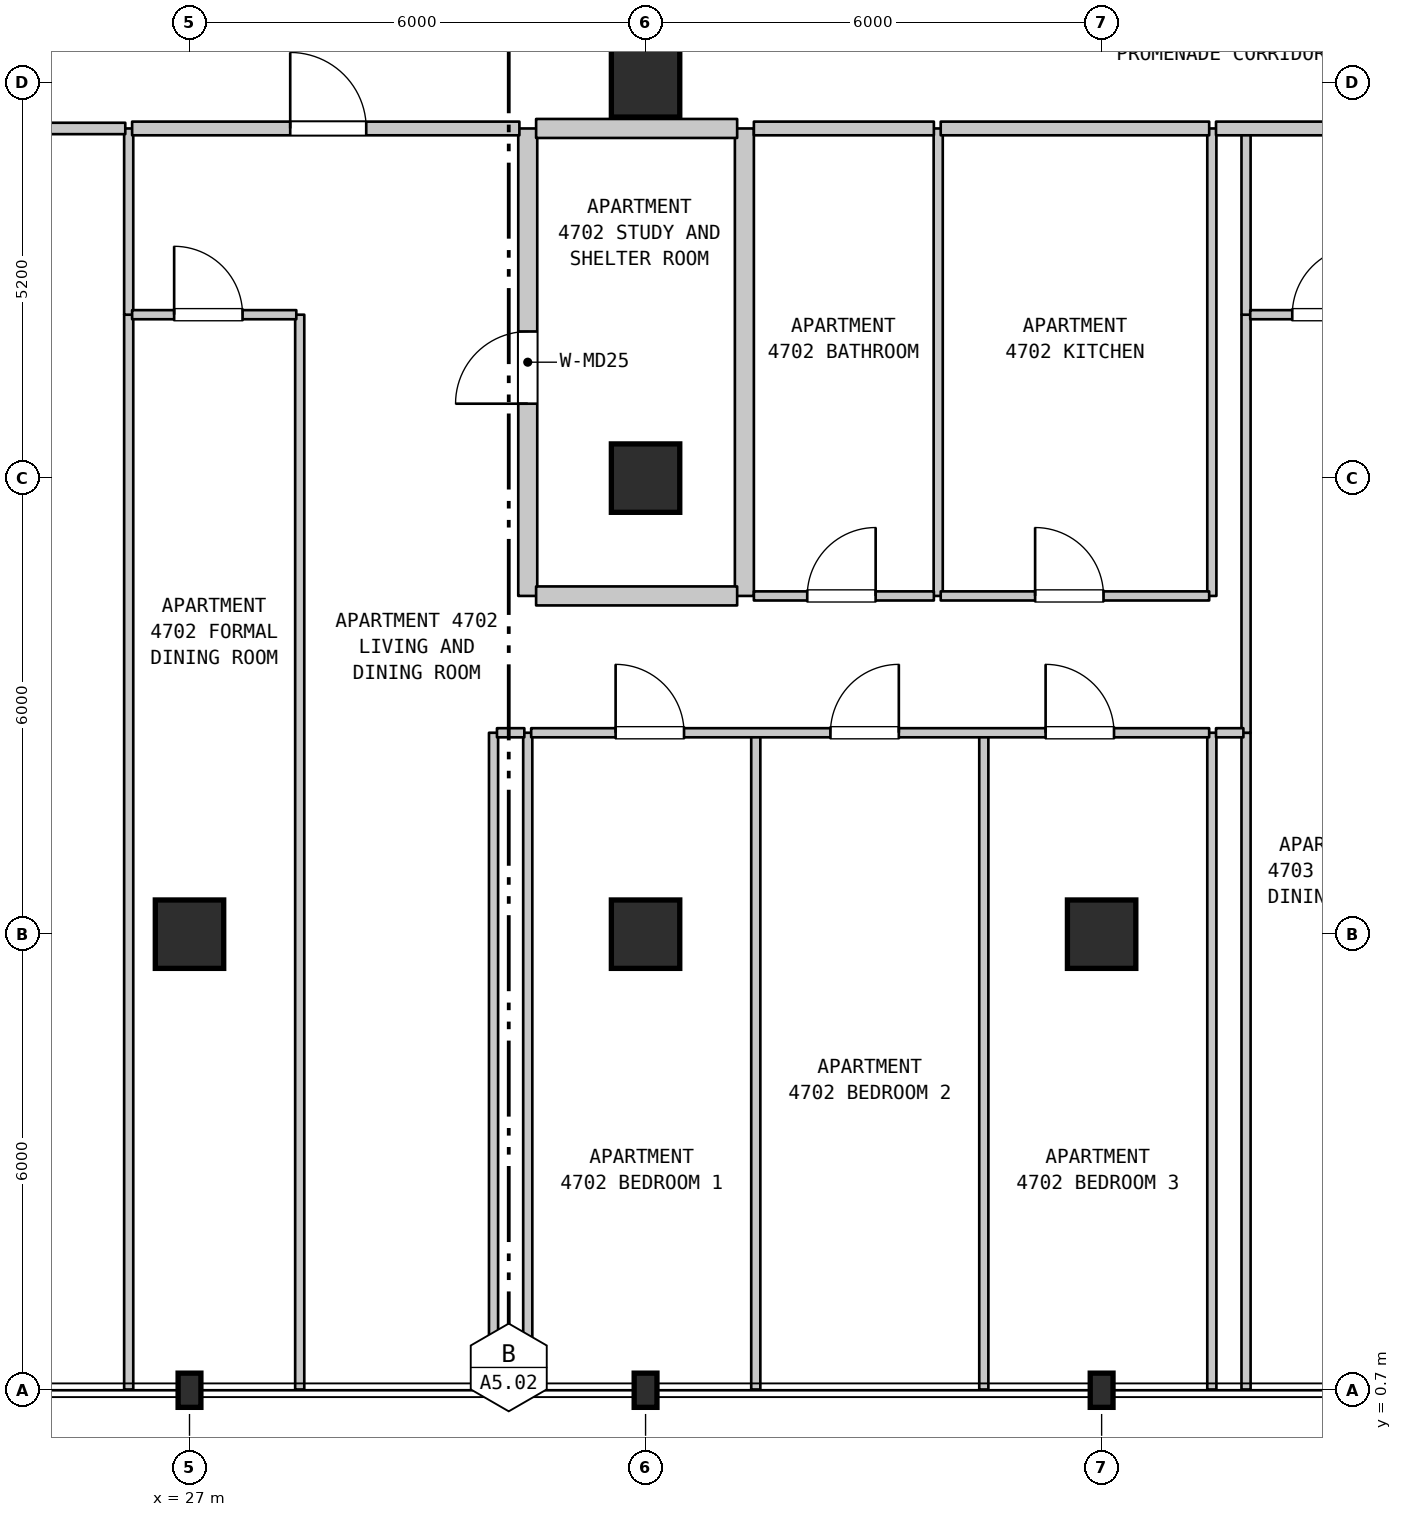
"""IFC4 building model, lengths in metres.
Left out: names, types, materials, properties, quantities, classifications, styles, units other than length and angle.
Written with IfcOpenShell. Run it as: python <this file> out.ifc"""

import sys

from ifc_helpers import new_model, si_unit, direction, frame, frame_2d, origin, origin_2d, place, context, subcontext, project, spatial, rectangle, i_section, extrude, element, fill, save


model = new_model("IFC4")
c1 = context("Model", 3, precision=1e-05, world=origin(), true_north=direction((0.0, 1.0)))
c2 = subcontext(c1, "Body", "Model", "MODEL_VIEW")
j1 = project(units=[si_unit("LENGTHUNIT", "METRE"), si_unit("PLANEANGLEUNIT", "RADIAN")], contexts=[c1])
p1 = place(None, origin())
s1 = spatial("IfcSite", under=j1, at=p1, CompositionType="ELEMENT")
p2 = place(p1, origin())
s2 = spatial("IfcBuilding", under=s1, at=p2, CompositionType="ELEMENT")
p3 = place(p2, frame((0.0, 0.0, 192.1)))
s3 = spatial("IfcBuildingStorey", under=s2, at=p3, CompositionType="ELEMENT", Elevation=192.1)
p4 = place(p3, frame((27.0, 0.7, 0.0), z_axis=(0.0, 0.0, 1.0), x_axis=(1.0, 0.0, 0.0)))
e1 = element("IfcColumn", 1, at=p4, inside=s3, PredefinedType="COLUMN", context=c2, shape_type="SweptSolid", body=[
    extrude(i_section(OverallWidth=0.3, OverallDepth=0.45, WebThickness=0.014, FlangeThickness=0.026, FilletRadius=0.027, at=origin_2d()), origin(), (0.0, 0.0, 1.0), 3.7),
])
p5 = place(p3, frame((27.0, 6.7, 0.0), z_axis=(0.0, 0.0, 1.0), x_axis=(1.0, 0.0, 0.0)))
e2 = element("IfcColumn", 2, at=p5, inside=s3, PredefinedType="COLUMN", context=c2, shape_type="SweptSolid", body=[
    extrude(rectangle(XDim=0.9, YDim=0.9, at=origin_2d()), origin(), (0.0, 0.0, 1.0), 3.7),
])
p6 = place(p3, frame((33.0, 0.7, 0.0), z_axis=(0.0, 0.0, 1.0), x_axis=(1.0, 0.0, 0.0)))
e3 = element("IfcColumn", 3, at=p6, inside=s3, PredefinedType="COLUMN", context=c2, shape_type="SweptSolid", body=[
    extrude(i_section(OverallWidth=0.3, OverallDepth=0.45, WebThickness=0.014, FlangeThickness=0.026, FilletRadius=0.027, at=origin_2d()), origin(), (0.0, 0.0, 1.0), 3.7),
])
for number, where, z_axis, x_axis in (
    (4, (33.0, 6.7, 0.0), (0.0, 0.0, 1.0), (1.0, 0.0, 0.0)),
    (5, (33.0, 12.7, 0.0), (0.0, 0.0, 1.0), (1.0, 0.0, 0.0)),
    (6, (33.0, 17.9, 0.0), (0.0, 0.0, 1.0), (1.0, 0.0, 0.0)),
):
    element("IfcColumn", number, at=place(p3, frame(where, z_axis=z_axis, x_axis=x_axis)), inside=s3, PredefinedType="COLUMN", context=c2, shape_type="SweptSolid", body=[
        extrude(rectangle(XDim=0.9, YDim=0.9, at=origin_2d()), origin(), (0.0, 0.0, 1.0), 3.7),
    ])
p7 = place(p3, frame((39.0, 0.7, 0.0), z_axis=(0.0, 0.0, 1.0), x_axis=(1.0, 0.0, 0.0)))
e7 = element("IfcColumn", 7, at=p7, inside=s3, PredefinedType="COLUMN", context=c2, shape_type="SweptSolid", body=[
    extrude(i_section(OverallWidth=0.3, OverallDepth=0.45, WebThickness=0.014, FlangeThickness=0.026, FilletRadius=0.027, at=origin_2d()), origin(), (0.0, 0.0, 1.0), 3.7),
])
p8 = place(p3, frame((39.0, 6.7, 0.0), z_axis=(0.0, 0.0, 1.0), x_axis=(1.0, 0.0, 0.0)))
e8 = element("IfcColumn", 8, at=p8, inside=s3, PredefinedType="COLUMN", context=c2, shape_type="SweptSolid", body=[
    extrude(rectangle(XDim=0.9, YDim=0.9, at=origin_2d()), origin(), (0.0, 0.0, 1.0), 3.7),
])
p9 = place(p3, frame((26.2, 0.71, 0.0), z_axis=(0.0, 0.0, 1.0), x_axis=(0.0, 1.0, 0.0)))
e9 = element("IfcWall", 9, at=p9, inside=s3, PredefinedType="PARTITIONING", context=c2, shape_type="SweptSolid", body=[
    extrude(rectangle(XDim=14.14, YDim=0.12, at=frame_2d((7.07, 0.0))), origin(), (0.0, 0.0, 1.0), 3.39),
])
p10 = place(p3, frame((26.2, 14.85, 0.0), z_axis=(0.0, 0.0, 1.0), x_axis=(0.0, 1.0, 0.0)))
e10 = element("IfcWall", 10, at=p10, inside=s3, PredefinedType="PARTITIONING", context=c2, shape_type="SweptSolid", body=[
    extrude(rectangle(XDim=2.45, YDim=0.12, at=frame_2d((1.225, 0.0))), origin(), (0.0, 0.0, 1.0), 3.39),
])
p11 = place(p3, frame((28.45, 0.71, 0.0), z_axis=(0.0, 0.0, 1.0), x_axis=(0.0, 1.0, 0.0)))
e11 = element("IfcWall", 11, at=p11, inside=s3, PredefinedType="PARTITIONING", context=c2, shape_type="SweptSolid", body=[
    extrude(rectangle(XDim=14.14, YDim=0.12, at=frame_2d((7.07, 0.0))), origin(), (0.0, 0.0, 1.0), 3.39),
])
for number, where, z_axis, x_axis in (
    (12, (31.0, 0.71, 0.0), (0.0, 0.0, 1.0), (0.0, 1.0, 0.0)),
    (13, (31.45, 0.71, 0.0), (0.0, 0.0, 1.0), (0.0, 1.0, 0.0)),
):
    element("IfcWall", number, at=place(p3, frame(where, z_axis=z_axis, x_axis=x_axis)), inside=s3, PredefinedType="PARTITIONING", context=c2, shape_type="SweptSolid", body=[
        extrude(rectangle(XDim=8.64, YDim=0.12, at=frame_2d((4.32, 0.0))), origin(), (0.0, 0.0, 1.0), 3.39),
    ])
p12 = place(p3, frame((31.45, 11.15, 0.0), z_axis=(0.0, 0.0, 1.0), x_axis=(0.0, 1.0, 0.0)))
e14 = element("IfcWall", 14, at=p12, inside=s3, PredefinedType="STANDARD", context=c2, shape_type="SweptSolid", body=[
    extrude(rectangle(XDim=6.15, YDim=0.25, at=frame_2d((3.075, 0.0))), origin(), (0.0, 0.0, 1.0), 3.39),
])
p13 = place(p12, frame((2.529, 0.0, 0.0)))
e15 = element("IfcOpeningElement", 15, at=p13, cuts=e14, PredefinedType="OPENING", context=c2, shape_type="SweptSolid", body=[
    extrude(rectangle(XDim=0.95, YDim=2.15, at=frame_2d((0.475, 1.075))), frame((0.0, 0.135, 0.0), z_axis=(0.0, -1.0, 0.0), x_axis=(1.0, 0.0, 0.0)), (0.0, 0.0, 1.0), 0.27),
])
p14 = place(p3, frame((34.3, 11.15, 0.0), z_axis=(0.0, 0.0, 1.0), x_axis=(0.0, 1.0, 0.0)))
e16 = element("IfcWall", 16, at=p14, inside=s3, PredefinedType="STANDARD", context=c2, shape_type="SweptSolid", body=[
    extrude(rectangle(XDim=6.15, YDim=0.25, at=frame_2d((3.075, 0.0))), origin(), (0.0, 0.0, 1.0), 3.39),
])
p15 = place(p3, frame((34.45, 0.71, 0.0), z_axis=(0.0, 0.0, 1.0), x_axis=(0.0, 1.0, 0.0)))
e17 = element("IfcWall", 17, at=p15, inside=s3, PredefinedType="PARTITIONING", context=c2, shape_type="SweptSolid", body=[
    extrude(rectangle(XDim=8.64, YDim=0.12, at=frame_2d((4.32, 0.0))), origin(), (0.0, 0.0, 1.0), 3.39),
])
p16 = place(p3, frame((36.85, 11.15, 0.0), z_axis=(0.0, 0.0, 1.0), x_axis=(0.0, 1.0, 0.0)))
e18 = element("IfcWall", 18, at=p16, inside=s3, PredefinedType="PARTITIONING", context=c2, shape_type="SweptSolid", body=[
    extrude(rectangle(XDim=6.15, YDim=0.12, at=frame_2d((3.075, 0.0))), origin(), (0.0, 0.0, 1.0), 3.39),
])
for number, where, z_axis, x_axis in (
    (19, (37.45, 0.71, 0.0), (0.0, 0.0, 1.0), (0.0, 1.0, 0.0)),
    (20, (40.45, 0.71, 0.0), (0.0, 0.0, 1.0), (0.0, 1.0, 0.0)),
):
    element("IfcWall", number, at=place(p3, frame(where, z_axis=z_axis, x_axis=x_axis)), inside=s3, PredefinedType="PARTITIONING", context=c2, shape_type="SweptSolid", body=[
        extrude(rectangle(XDim=8.64, YDim=0.12, at=frame_2d((4.32, 0.0))), origin(), (0.0, 0.0, 1.0), 3.39),
    ])
p17 = place(p3, frame((40.45, 11.15, 0.0), z_axis=(0.0, 0.0, 1.0), x_axis=(0.0, 1.0, 0.0)))
e21 = element("IfcWall", 21, at=p17, inside=s3, PredefinedType="PARTITIONING", context=c2, shape_type="SweptSolid", body=[
    extrude(rectangle(XDim=6.15, YDim=0.12, at=frame_2d((3.075, 0.0))), origin(), (0.0, 0.0, 1.0), 3.39),
])
p18 = place(p3, frame((40.9, 0.71, 0.0), z_axis=(0.0, 0.0, 1.0), x_axis=(0.0, 1.0, 0.0)))
e22 = element("IfcWall", 22, at=p18, inside=s3, PredefinedType="PARTITIONING", context=c2, shape_type="SweptSolid", body=[
    extrude(rectangle(XDim=8.64, YDim=0.12, at=frame_2d((4.32, 0.0))), origin(), (0.0, 0.0, 1.0), 3.39),
])
p19 = place(p3, frame((40.9, 9.35, 0.0), z_axis=(0.0, 0.0, 1.0), x_axis=(0.0, 1.0, 0.0)))
e23 = element("IfcWall", 23, at=p19, inside=s3, PredefinedType="PARTITIONING", context=c2, shape_type="SweptSolid", body=[
    extrude(rectangle(XDim=5.5, YDim=0.12, at=frame_2d((2.75, 0.0))), origin(), (0.0, 0.0, 1.0), 3.39),
])
p20 = place(p3, frame((40.9, 14.85, 0.0), z_axis=(0.0, 0.0, 1.0), x_axis=(0.0, 1.0, 0.0)))
e24 = element("IfcWall", 24, at=p20, inside=s3, PredefinedType="PARTITIONING", context=c2, shape_type="SweptSolid", body=[
    extrude(rectangle(XDim=2.45, YDim=0.12, at=frame_2d((1.225, 0.0))), origin(), (0.0, 0.0, 1.0), 3.39),
])
p21 = place(p3, frame((31.045, 9.35, 0.0), z_axis=(0.0, 0.0, 1.0), x_axis=(1.0, 0.0, 0.0)))
e25 = element("IfcWall", 25, at=p21, inside=s3, PredefinedType="PARTITIONING", context=c2, shape_type="SweptSolid", body=[
    extrude(rectangle(XDim=0.36, YDim=0.12, at=frame_2d((0.18, 0.0))), origin(), (0.0, 0.0, 1.0), 3.39),
])
p22 = place(p3, frame((31.495, 9.35, 0.0), z_axis=(0.0, 0.0, 1.0), x_axis=(1.0, 0.0, 0.0)))
e26 = element("IfcWall", 26, at=p22, inside=s3, PredefinedType="PARTITIONING", context=c2, shape_type="SweptSolid", body=[
    extrude(rectangle(XDim=8.92, YDim=0.12, at=frame_2d((4.46, 0.0))), origin(), (0.0, 0.0, 1.0), 3.39),
])
p23 = place(p22, frame((1.111, 0.0, 0.0)))
e27 = element("IfcOpeningElement", 27, at=p23, cuts=e26, PredefinedType="OPENING", context=c2, shape_type="SweptSolid", body=[
    extrude(rectangle(XDim=0.9, YDim=2.15, at=frame_2d((0.45, 1.075))), frame((0.0, 0.07, 0.0), z_axis=(0.0, -1.0, 0.0), x_axis=(1.0, 0.0, 0.0)), (0.0, 0.0, 1.0), 0.14),
])
p24 = place(p22, frame((3.937, 0.0, 0.0)))
e28 = element("IfcOpeningElement", 28, at=p24, cuts=e26, PredefinedType="OPENING", context=c2, shape_type="SweptSolid", body=[
    extrude(rectangle(XDim=0.9, YDim=2.15, at=frame_2d((0.45, 1.075))), frame((0.0, 0.07, 0.0), z_axis=(0.0, -1.0, 0.0), x_axis=(1.0, 0.0, 0.0)), (0.0, 0.0, 1.0), 0.14),
])
p25 = place(p22, frame((6.768, 0.0, 0.0)))
e29 = element("IfcOpeningElement", 29, at=p25, cuts=e26, PredefinedType="OPENING", context=c2, shape_type="SweptSolid", body=[
    extrude(rectangle(XDim=0.9, YDim=2.15, at=frame_2d((0.45, 1.075))), frame((0.0, 0.07, 0.0), z_axis=(0.0, -1.0, 0.0), x_axis=(1.0, 0.0, 0.0)), (0.0, 0.0, 1.0), 0.14),
])
p26 = place(p3, frame((40.505, 9.35, 0.0), z_axis=(0.0, 0.0, 1.0), x_axis=(1.0, 0.0, 0.0)))
e30 = element("IfcWall", 30, at=p26, inside=s3, PredefinedType="PARTITIONING", context=c2, shape_type="SweptSolid", body=[
    extrude(rectangle(XDim=0.36, YDim=0.12, at=frame_2d((0.18, 0.0))), origin(), (0.0, 0.0, 1.0), 3.39),
])
p27 = place(p3, frame((31.56, 11.15, 0.0), z_axis=(0.0, 0.0, 1.0), x_axis=(1.0, 0.0, 0.0)))
e31 = element("IfcWall", 31, at=p27, inside=s3, PredefinedType="STANDARD", context=c2, shape_type="SweptSolid", body=[
    extrude(rectangle(XDim=2.645, YDim=0.25, at=frame_2d((1.323, 0.0))), origin(), (0.0, 0.0, 1.0), 3.39),
])
p28 = place(p3, frame((34.425, 11.15, 0.0), z_axis=(0.0, 0.0, 1.0), x_axis=(1.0, 0.0, 0.0)))
e32 = element("IfcWall", 32, at=p28, inside=s3, PredefinedType="PARTITIONING", context=c2, shape_type="SweptSolid", body=[
    extrude(rectangle(XDim=2.368, YDim=0.12, at=frame_2d((1.184, 0.0))), origin(), (0.0, 0.0, 1.0), 3.39),
])
p29 = place(p28, frame((0.702, 0.0, 0.0)))
e33 = element("IfcOpeningElement", 33, at=p29, cuts=e32, PredefinedType="OPENING", context=c2, shape_type="SweptSolid", body=[
    extrude(rectangle(XDim=0.9, YDim=2.1, at=frame_2d((0.45, 1.05))), frame((0.0, 0.07, 0.0), z_axis=(0.0, -1.0, 0.0), x_axis=(1.0, 0.0, 0.0)), (0.0, 0.0, 1.0), 0.14),
])
p30 = place(p3, frame((36.883, 11.15, 0.0), z_axis=(0.0, 0.0, 1.0), x_axis=(1.0, 0.0, 0.0)))
e34 = element("IfcWall", 34, at=p30, inside=s3, PredefinedType="PARTITIONING", context=c2, shape_type="SweptSolid", body=[
    extrude(rectangle(XDim=3.532, YDim=0.12, at=frame_2d((1.766, 0.0))), origin(), (0.0, 0.0, 1.0), 3.39),
])
p31 = place(p30, frame((1.242, 0.0, 0.0)))
e35 = element("IfcOpeningElement", 35, at=p31, cuts=e34, PredefinedType="OPENING", context=c2, shape_type="SweptSolid", body=[
    extrude(rectangle(XDim=0.9, YDim=2.15, at=frame_2d((0.45, 1.075))), frame((0.0, 0.07, 0.0), z_axis=(0.0, -1.0, 0.0), x_axis=(1.0, 0.0, 0.0)), (0.0, 0.0, 1.0), 0.14),
])
p32 = place(p3, frame((26.245, 14.85, 0.0), z_axis=(0.0, 0.0, 1.0), x_axis=(1.0, 0.0, 0.0)))
e36 = element("IfcWall", 36, at=p32, inside=s3, PredefinedType="PARTITIONING", context=c2, shape_type="SweptSolid", body=[
    extrude(rectangle(XDim=2.16, YDim=0.12, at=frame_2d((1.08, 0.0))), origin(), (0.0, 0.0, 1.0), 3.39),
])
p33 = place(p32, frame((0.553, 0.0, 0.0)))
e37 = element("IfcOpeningElement", 37, at=p33, cuts=e36, PredefinedType="OPENING", context=c2, shape_type="SweptSolid", body=[
    extrude(rectangle(XDim=0.9, YDim=2.15, at=frame_2d((0.45, 1.075))), frame((0.0, 0.07, 0.0), z_axis=(0.0, -1.0, 0.0), x_axis=(1.0, 0.0, 0.0)), (0.0, 0.0, 1.0), 0.14),
])
p34 = place(p3, frame((40.955, 14.85, 0.0), z_axis=(0.0, 0.0, 1.0), x_axis=(1.0, 0.0, 0.0)))
e38 = element("IfcWall", 38, at=p34, inside=s3, PredefinedType="PARTITIONING", context=c2, shape_type="SweptSolid", body=[
    extrude(rectangle(XDim=2.16, YDim=0.12, at=frame_2d((1.08, 0.0))), origin(), (0.0, 0.0, 1.0), 3.39),
])
p35 = place(p34, frame((0.553, 0.0, 0.0)))
e39 = element("IfcOpeningElement", 39, at=p35, cuts=e38, PredefinedType="OPENING", context=c2, shape_type="SweptSolid", body=[
    extrude(rectangle(XDim=0.9, YDim=2.15, at=frame_2d((0.45, 1.075))), frame((0.0, 0.07, 0.0), z_axis=(0.0, -1.0, 0.0), x_axis=(1.0, 0.0, 0.0)), (0.0, 0.0, 1.0), 0.14),
])
p36 = place(p3, frame((21.245, 17.3, 0.0), z_axis=(0.0, 0.0, 1.0), x_axis=(1.0, 0.0, 0.0)))
e40 = element("IfcWall", 40, at=p36, inside=s3, PredefinedType="STANDARD", context=c2, shape_type="SweptSolid", body=[
    extrude(rectangle(XDim=4.91, YDim=0.15, at=frame_2d((2.455, 0.0))), origin(), (0.0, 0.0, 1.0), 3.39),
])
p37 = place(p36, frame((1.884, 0.0, 0.0)))
e41 = element("IfcOpeningElement", 41, at=p37, cuts=e40, PredefinedType="OPENING", context=c2, shape_type="SweptSolid", body=[
    extrude(rectangle(XDim=1.0, YDim=2.15, at=frame_2d((0.5, 1.075))), frame((0.0, 0.085, 0.0), z_axis=(0.0, -1.0, 0.0), x_axis=(1.0, 0.0, 0.0)), (0.0, 0.0, 1.0), 0.17),
])
p38 = place(p3, frame((26.245, 17.3, 0.0), z_axis=(0.0, 0.0, 1.0), x_axis=(1.0, 0.0, 0.0)))
e42 = element("IfcWall", 42, at=p38, inside=s3, PredefinedType="STANDARD", context=c2, shape_type="SweptSolid", body=[
    extrude(rectangle(XDim=5.095, YDim=0.18, at=frame_2d((2.547, 0.0))), origin(), (0.0, 0.0, 1.0), 3.39),
])
p39 = place(p38, frame((2.08, 0.0, 0.0)))
e43 = element("IfcOpeningElement", 43, at=p39, cuts=e42, PredefinedType="OPENING", context=c2, shape_type="SweptSolid", body=[
    extrude(rectangle(XDim=1.0, YDim=2.15, at=frame_2d((0.5, 1.075))), frame((0.0, 0.1, 0.0), z_axis=(0.0, -1.0, 0.0), x_axis=(1.0, 0.0, 0.0)), (0.0, 0.0, 1.0), 0.2),
])
p40 = place(p3, frame((31.56, 17.3, 0.0), z_axis=(0.0, 0.0, 1.0), x_axis=(1.0, 0.0, 0.0)))
e44 = element("IfcWall", 44, at=p40, inside=s3, PredefinedType="STANDARD", context=c2, shape_type="SweptSolid", body=[
    extrude(rectangle(XDim=2.645, YDim=0.25, at=frame_2d((1.323, 0.0))), origin(), (0.0, 0.0, 1.0), 3.39),
])
p41 = place(p3, frame((34.425, 17.3, 0.0), z_axis=(0.0, 0.0, 1.0), x_axis=(1.0, 0.0, 0.0)))
e45 = element("IfcWall", 45, at=p41, inside=s3, PredefinedType="STANDARD", context=c2, shape_type="SweptSolid", body=[
    extrude(rectangle(XDim=2.368, YDim=0.18, at=frame_2d((1.184, 0.0))), origin(), (0.0, 0.0, 1.0), 3.39),
])
p42 = place(p3, frame((36.883, 17.3, 0.0), z_axis=(0.0, 0.0, 1.0), x_axis=(1.0, 0.0, 0.0)))
e46 = element("IfcWall", 46, at=p42, inside=s3, PredefinedType="STANDARD", context=c2, shape_type="SweptSolid", body=[
    extrude(rectangle(XDim=3.532, YDim=0.18, at=frame_2d((1.766, 0.0))), origin(), (0.0, 0.0, 1.0), 3.39),
])
p43 = place(p3, frame((40.505, 17.3, 0.0), z_axis=(0.0, 0.0, 1.0), x_axis=(1.0, 0.0, 0.0)))
e47 = element("IfcWall", 47, at=p43, inside=s3, PredefinedType="STANDARD", context=c2, shape_type="SweptSolid", body=[
    extrude(rectangle(XDim=5.545, YDim=0.18, at=frame_2d((2.772, 0.0))), origin(), (0.0, 0.0, 1.0), 3.39),
])
p44 = place(p43, frame((2.305, 0.0, 0.0)))
e48 = element("IfcOpeningElement", 48, at=p44, cuts=e47, PredefinedType="OPENING", context=c2, shape_type="SweptSolid", body=[
    extrude(rectangle(XDim=1.0, YDim=2.15, at=frame_2d((0.5, 1.075))), frame((0.0, 0.1, 0.0), z_axis=(0.0, -1.0, 0.0), x_axis=(1.0, 0.0, 0.0)), (0.0, 0.0, 1.0), 0.2),
])
p45 = place(p13, origin())
e49 = element("IfcDoor", 49, at=p45, inside=s3, OperationType="SINGLE_SWING_LEFT", PredefinedType="DOOR", context=c2, shape_type="SweptSolid", body=[
    extrude(rectangle(XDim=0.95, YDim=2.15, at=frame_2d((0.475, 1.075))), frame((0.0, 0.025, 0.0), z_axis=(0.0, -1.0, 0.0), x_axis=(1.0, 0.0, 0.0)), (0.0, 0.0, 1.0), 0.05),
])
fill(e15, e49)
p46 = place(p23, origin())
e50 = element("IfcDoor", 50, at=p46, inside=s3, OperationType="SINGLE_SWING_LEFT", PredefinedType="DOOR", context=c2, shape_type="SweptSolid", body=[
    extrude(rectangle(XDim=0.9, YDim=2.15, at=frame_2d((0.45, 1.075))), frame((0.0, 0.025, 0.0), z_axis=(0.0, -1.0, 0.0), x_axis=(1.0, 0.0, 0.0)), (0.0, 0.0, 1.0), 0.05),
])
fill(e27, e50)
p47 = place(p24, origin())
e51 = element("IfcDoor", 51, at=p47, inside=s3, OperationType="SINGLE_SWING_RIGHT", PredefinedType="DOOR", context=c2, shape_type="SweptSolid", body=[
    extrude(rectangle(XDim=0.9, YDim=2.15, at=frame_2d((0.45, 1.075))), frame((0.0, 0.025, 0.0), z_axis=(0.0, -1.0, 0.0), x_axis=(1.0, 0.0, 0.0)), (0.0, 0.0, 1.0), 0.05),
])
fill(e28, e51)
p48 = place(p25, origin())
e52 = element("IfcDoor", 52, at=p48, inside=s3, OperationType="SINGLE_SWING_LEFT", PredefinedType="DOOR", context=c2, shape_type="SweptSolid", body=[
    extrude(rectangle(XDim=0.9, YDim=2.15, at=frame_2d((0.45, 1.075))), frame((0.0, 0.025, 0.0), z_axis=(0.0, -1.0, 0.0), x_axis=(1.0, 0.0, 0.0)), (0.0, 0.0, 1.0), 0.05),
])
fill(e29, e52)
p49 = place(p29, origin())
e53 = element("IfcDoor", 53, at=p49, inside=s3, OperationType="SINGLE_SWING_RIGHT", PredefinedType="DOOR", context=c2, shape_type="SweptSolid", body=[
    extrude(rectangle(XDim=0.9, YDim=2.1, at=frame_2d((0.45, 1.05))), frame((0.0, 0.025, 0.0), z_axis=(0.0, -1.0, 0.0), x_axis=(1.0, 0.0, 0.0)), (0.0, 0.0, 1.0), 0.05),
])
fill(e33, e53)
p50 = place(p31, origin())
e54 = element("IfcDoor", 54, at=p50, inside=s3, OperationType="SINGLE_SWING_LEFT", PredefinedType="DOOR", context=c2, shape_type="SweptSolid", body=[
    extrude(rectangle(XDim=0.9, YDim=2.15, at=frame_2d((0.45, 1.075))), frame((0.0, 0.025, 0.0), z_axis=(0.0, -1.0, 0.0), x_axis=(1.0, 0.0, 0.0)), (0.0, 0.0, 1.0), 0.05),
])
fill(e35, e54)
p51 = place(p33, origin())
e55 = element("IfcDoor", 55, at=p51, inside=s3, OperationType="SINGLE_SWING_LEFT", PredefinedType="DOOR", context=c2, shape_type="SweptSolid", body=[
    extrude(rectangle(XDim=0.9, YDim=2.15, at=frame_2d((0.45, 1.075))), frame((0.0, 0.025, 0.0), z_axis=(0.0, -1.0, 0.0), x_axis=(1.0, 0.0, 0.0)), (0.0, 0.0, 1.0), 0.05),
])
fill(e37, e55)
p52 = place(p35, origin())
e56 = element("IfcDoor", 56, at=p52, inside=s3, OperationType="SINGLE_SWING_RIGHT", PredefinedType="DOOR", context=c2, shape_type="SweptSolid", body=[
    extrude(rectangle(XDim=0.9, YDim=2.15, at=frame_2d((0.45, 1.075))), frame((0.0, 0.025, 0.0), z_axis=(0.0, -1.0, 0.0), x_axis=(1.0, 0.0, 0.0)), (0.0, 0.0, 1.0), 0.05),
])
fill(e39, e56)
p53 = place(p39, origin())
e57 = element("IfcDoor", 57, at=p53, inside=s3, OperationType="SINGLE_SWING_LEFT", PredefinedType="DOOR", context=c2, shape_type="SweptSolid", body=[
    extrude(rectangle(XDim=1.0, YDim=2.15, at=frame_2d((0.5, 1.075))), frame((0.0, 0.025, 0.0), z_axis=(0.0, -1.0, 0.0), x_axis=(1.0, 0.0, 0.0)), (0.0, 0.0, 1.0), 0.05),
])
fill(e43, e57)
save(model, sys.argv[1])
